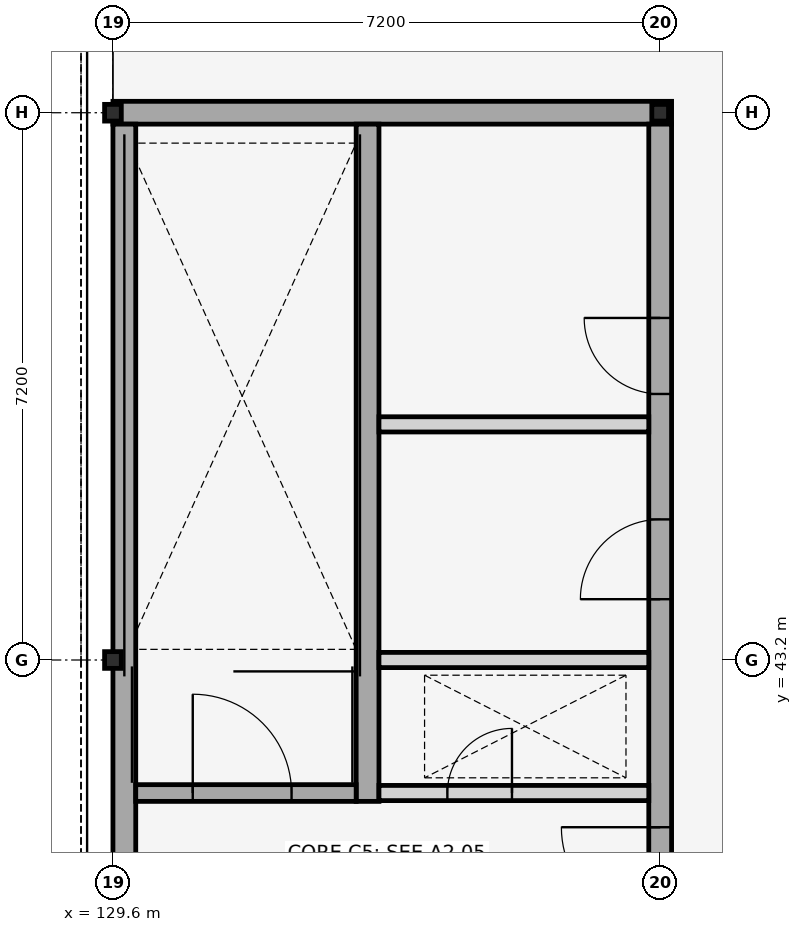
"""IFC4 building model, lengths in metres.
Left out: names, types, materials, properties, quantities, classifications, styles, units other than length and angle.
Written with IfcOpenShell. Run it as: python <this file> out.ifc"""

import sys

from ifc_helpers import new_model, si_unit, direction, frame, frame_2d, origin, origin_2d, place, context, subcontext, project, spatial, rectangle, i_section, extrude, element, fill, save


model = new_model("IFC4")
c1 = context("Model", 3, precision=1e-05, world=origin(), true_north=direction((0.0, 1.0)))
c2 = subcontext(c1, "Body", "Model", "MODEL_VIEW")
j1 = project(units=[si_unit("LENGTHUNIT", "METRE"), si_unit("PLANEANGLEUNIT", "RADIAN")], contexts=[c1])
p1 = place(None, origin())
s1 = spatial("IfcSite", under=j1, at=p1, CompositionType="ELEMENT")
p2 = place(p1, origin())
s2 = spatial("IfcBuilding", under=s1, at=p2, CompositionType="ELEMENT")
p3 = place(p2, frame((0.0, 0.0, 8.7)))
s3 = spatial("IfcBuildingStorey", under=s2, at=p3, CompositionType="ELEMENT", Elevation=8.7)
for number, where, z_axis, x_axis in (
    (1, (129.6, 43.2, 0.0), (0.0, 0.0, 1.0), (1.0, 0.0, 0.0)),
    (2, (129.6, 50.4, 0.0), (0.0, 0.0, 1.0), (0.0, 1.0, 0.0)),
    (3, (136.8, 50.4, 0.0), (0.0, 0.0, 1.0), (1.0, 0.0, 0.0)),
):
    element("IfcColumn", number, at=place(p3, frame(where, z_axis=z_axis, x_axis=x_axis)), inside=s3, PredefinedType="COLUMN", context=c2, shape_type="SweptSolid", body=[
        extrude(i_section(OverallWidth=0.22, OverallDepth=0.22, WebThickness=0.01, FlangeThickness=0.016, FilletRadius=0.018, at=origin_2d()), origin(), (0.0, 0.0, 1.0), 4.2),
    ])
p4 = place(p3, frame((129.6, 50.4, 0.0), z_axis=(0.0, 0.0, 1.0), x_axis=(1.0, 0.0, 0.0)))
e4 = element("IfcWall", 4, at=p4, inside=s3, PredefinedType="SHEAR", context=c2, shape_type="SweptSolid", body=[
    extrude(rectangle(XDim=7.35, YDim=0.3, at=frame_2d((3.675, 0.0))), origin(), (0.0, 0.0, 1.0), 3.96),
])
p5 = place(p3, frame((129.75, 36.15, 0.0), z_axis=(0.0, 0.0, 1.0), x_axis=(0.0, 1.0, 0.0)))
e5 = element("IfcWall", 5, at=p5, inside=s3, PredefinedType="SHEAR", context=c2, shape_type="SweptSolid", body=[
    extrude(rectangle(XDim=14.1, YDim=0.3, at=frame_2d((7.05, 0.0))), origin(), (0.0, 0.0, 1.0), 3.96),
])
p6 = place(p3, frame((136.8, 36.15, 0.0), z_axis=(0.0, 0.0, 1.0), x_axis=(0.0, 1.0, 0.0)))
e6 = element("IfcWall", 6, at=p6, inside=s3, PredefinedType="SHEAR", context=c2, shape_type="SweptSolid", body=[
    extrude(rectangle(XDim=14.1, YDim=0.3, at=frame_2d((7.05, 0.0))), origin(), (0.0, 0.0, 1.0), 3.96),
])
p7 = place(p6, frame((3.55, 0.0, 0.0)))
e7 = element("IfcOpeningElement", 7, at=p7, cuts=e6, PredefinedType="OPENING", context=c2, shape_type="SweptSolid", body=[
    extrude(rectangle(XDim=1.3, YDim=2.2, at=frame_2d((0.65, 1.1))), frame((0.0, 0.16, 0.0), z_axis=(0.0, -1.0, 0.0), x_axis=(1.0, 0.0, 0.0)), (0.0, 0.0, 1.0), 0.32),
])
p8 = place(p6, frame((7.85, 0.0, 0.0)))
e8 = element("IfcOpeningElement", 8, at=p8, cuts=e6, PredefinedType="OPENING", context=c2, shape_type="SweptSolid", body=[
    extrude(rectangle(XDim=1.05, YDim=2.15, at=frame_2d((0.525, 1.075))), frame((0.0, 0.16, 0.0), z_axis=(0.0, -1.0, 0.0), x_axis=(1.0, 0.0, 0.0)), (0.0, 0.0, 1.0), 0.32),
])
p9 = place(p6, frame((10.55, 0.0, 0.0)))
e9 = element("IfcOpeningElement", 9, at=p9, cuts=e6, PredefinedType="OPENING", context=c2, shape_type="SweptSolid", body=[
    extrude(rectangle(XDim=1.0, YDim=2.15, at=frame_2d((0.5, 1.075))), frame((0.0, 0.16, 0.0), z_axis=(0.0, -1.0, 0.0), x_axis=(1.0, 0.0, 0.0)), (0.0, 0.0, 1.0), 0.32),
])
p10 = place(p3, frame((132.95, 41.34, 0.0), z_axis=(0.0, 0.0, 1.0), x_axis=(0.0, 1.0, 0.0)))
e10 = element("IfcWall", 10, at=p10, inside=s3, PredefinedType="SHEAR", context=c2, shape_type="SweptSolid", body=[
    extrude(rectangle(XDim=8.91, YDim=0.3, at=frame_2d((4.455, 0.0))), origin(), (0.0, 0.0, 1.0), 3.96),
])
p11 = place(p3, frame((133.1, 41.45, 0.0), z_axis=(0.0, 0.0, 1.0), x_axis=(1.0, 0.0, 0.0)))
e11 = element("IfcWall", 11, at=p11, inside=s3, PredefinedType="PLUMBINGWALL", context=c2, shape_type="SweptSolid", body=[
    extrude(rectangle(XDim=3.55, YDim=0.2, at=frame_2d((1.775, 0.0))), origin(), (0.0, 0.0, 1.0), 3.38),
])
p12 = place(p11, frame((0.9, 0.0, 0.0)))
e12 = element("IfcOpeningElement", 12, at=p12, cuts=e11, PredefinedType="OPENING", context=c2, shape_type="SweptSolid", body=[
    extrude(rectangle(XDim=0.85, YDim=2.05, at=frame_2d((0.425, 1.025))), frame((0.0, 0.11, 0.0), z_axis=(0.0, -1.0, 0.0), x_axis=(1.0, 0.0, 0.0)), (0.0, 0.0, 1.0), 0.22),
])
p13 = place(p3, frame((129.9, 41.45, 0.0), z_axis=(0.0, 0.0, 1.0), x_axis=(1.0, 0.0, 0.0)))
e13 = element("IfcWall", 13, at=p13, inside=s3, PredefinedType="SHEAR", context=c2, shape_type="SweptSolid", body=[
    extrude(rectangle(XDim=2.9, YDim=0.22, at=frame_2d((1.45, 0.0))), origin(), (0.0, 0.0, 1.0), 3.96),
])
p14 = place(p13, frame((0.75, 0.0, 0.0)))
e14 = element("IfcOpeningElement", 14, at=p14, cuts=e13, PredefinedType="OPENING", context=c2, shape_type="SweptSolid", body=[
    extrude(rectangle(XDim=1.3, YDim=2.2, at=frame_2d((0.65, 1.1))), frame((0.0, 0.12, 0.0), z_axis=(0.0, -1.0, 0.0), x_axis=(1.0, 0.0, 0.0)), (0.0, 0.0, 1.0), 0.24),
])
for number, where, z_axis, x_axis in (
    (15, (133.1, 43.2, 0.0), (0.0, 0.0, 1.0), (1.0, 0.0, 0.0)),
    (16, (133.1, 46.3, 0.0), (0.0, 0.0, 1.0), (1.0, 0.0, 0.0)),
):
    element("IfcWall", number, at=place(p3, frame(where, z_axis=z_axis, x_axis=x_axis)), inside=s3, PredefinedType="PLUMBINGWALL", context=c2, shape_type="SweptSolid", body=[
        extrude(rectangle(XDim=3.55, YDim=0.2, at=frame_2d((1.775, 0.0))), origin(), (0.0, 0.0, 1.0), 3.38),
    ])
p15 = place(p7, origin())
e17 = element("IfcDoor", 17, at=p15, inside=s3, OperationType="SINGLE_SWING_RIGHT", PredefinedType="DOOR", context=c2, shape_type="SweptSolid", body=[
    extrude(rectangle(XDim=1.3, YDim=2.2, at=frame_2d((0.65, 1.1))), frame((0.0, 0.025, 0.0), z_axis=(0.0, -1.0, 0.0), x_axis=(1.0, 0.0, 0.0)), (0.0, 0.0, 1.0), 0.05),
])
fill(e7, e17)
p16 = place(p8, origin())
e18 = element("IfcDoor", 18, at=p16, inside=s3, OperationType="SINGLE_SWING_LEFT", PredefinedType="DOOR", context=c2, shape_type="SweptSolid", body=[
    extrude(rectangle(XDim=1.05, YDim=2.15, at=frame_2d((0.525, 1.075))), frame((0.0, 0.025, 0.0), z_axis=(0.0, -1.0, 0.0), x_axis=(1.0, 0.0, 0.0)), (0.0, 0.0, 1.0), 0.05),
])
fill(e8, e18)
p17 = place(p9, origin())
e19 = element("IfcDoor", 19, at=p17, inside=s3, OperationType="SINGLE_SWING_RIGHT", PredefinedType="DOOR", context=c2, shape_type="SweptSolid", body=[
    extrude(rectangle(XDim=1.0, YDim=2.15, at=frame_2d((0.5, 1.075))), frame((0.0, 0.025, 0.0), z_axis=(0.0, -1.0, 0.0), x_axis=(1.0, 0.0, 0.0)), (0.0, 0.0, 1.0), 0.05),
])
fill(e9, e19)
p18 = place(p12, origin())
e20 = element("IfcDoor", 20, at=p18, inside=s3, OperationType="SINGLE_SWING_RIGHT", PredefinedType="TRAPDOOR", context=c2, shape_type="SweptSolid", body=[
    extrude(rectangle(XDim=0.85, YDim=2.05, at=frame_2d((0.425, 1.025))), frame((0.0, 0.025, 0.0), z_axis=(0.0, -1.0, 0.0), x_axis=(1.0, 0.0, 0.0)), (0.0, 0.0, 1.0), 0.05),
])
fill(e12, e20)
p19 = place(p14, origin())
e21 = element("IfcDoor", 21, at=p19, inside=s3, OperationType="SINGLE_SWING_LEFT", PredefinedType="DOOR", context=c2, shape_type="SweptSolid", body=[
    extrude(rectangle(XDim=1.3, YDim=2.2, at=frame_2d((0.65, 1.1))), frame((0.0, 0.025, 0.0), z_axis=(0.0, -1.0, 0.0), x_axis=(1.0, 0.0, 0.0)), (0.0, 0.0, 1.0), 0.05),
])
fill(e14, e21)
save(model, sys.argv[1])
